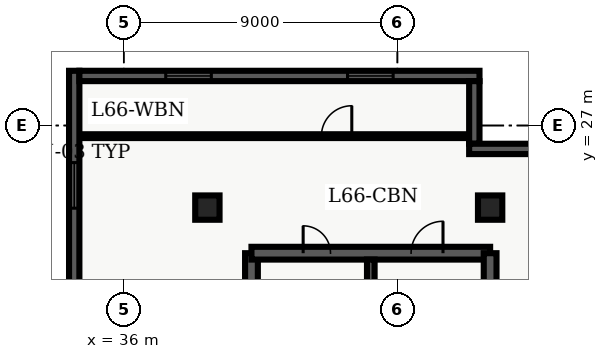
"""IFC4 building model, lengths in metres.
Left out: names, types, materials, properties, quantities, classifications, styles, units other than length and angle.
Written with IfcOpenShell. Run it as: python <this file> out.ifc"""

import sys

from ifc_helpers import new_model, entity, si_unit, converted_unit, direction, frame, origin_with_axes, origin_2d_with_axis, place, context, subcontext, project, spatial, polyline, rectangle, outline, extrude, element, fill, save


model = new_model("IFC4")
c1 = context("Model", 3, precision=1e-05, world=origin_with_axes(), true_north=direction((0.0, 1.0)))
c2 = subcontext(c1, "Body", "Model", "MODEL_VIEW")
j1 = project(units=[si_unit("LENGTHUNIT", "METRE"), converted_unit("PLANEANGLEUNIT", "DEGREE", entity("IfcPlaneAngleMeasure", 0.017), si_unit("PLANEANGLEUNIT", "RADIAN"), dimensions=[0, 0, 0, 0, 0, 0, 0])], contexts=[c1])
p1 = place(None, origin_with_axes())
s1 = spatial("IfcSite", under=j1, at=p1, CompositionType="ELEMENT")
p2 = place(p1, origin_with_axes())
s2 = spatial("IfcBuilding", under=s1, at=p2, CompositionType="ELEMENT")
p3 = place(p2, frame((0.0, 0.0, 268.5), z_axis=(0.0, 0.0, 1.0), x_axis=(1.0, 0.0, 0.0)))
s3 = spatial("IfcBuildingStorey", under=s2, at=p3, CompositionType="ELEMENT", Elevation=268.5)
p4 = place(p3, frame((40.2, 7.2, 0.0), z_axis=(0.0, 0.0, 1.0), x_axis=(0.0, 1.0, 0.0)))
e1 = element("IfcWall", 1, at=p4, inside=s3, PredefinedType="SHEAR", context=c2, shape_type="SweptSolid", body=[
    extrude(outline(polyline([(0.0, -0.21), (15.6, -0.21), (15.6, 0.21), (0.0, 0.21), (0.0, -0.21)])), origin_with_axes(), (0.0, 0.0, 1.0), 3.66),
])
p5 = place(p4, frame((12.75, 0.0, 0.0), z_axis=(0.0, 0.0, 1.0), x_axis=(1.0, 0.0, 0.0)))
e2 = element("IfcOpeningElement", 2, at=p5, cuts=e1, PredefinedType="OPENING", context=c2, shape_type="SweptSolid", body=[
    extrude(rectangle(XDim=1.2, YDim=0.44, at=origin_2d_with_axis()), origin_with_axes(), (0.0, 0.0, 1.0), 2.15),
])
p6 = place(p4, frame((9.3, 0.0, 0.0), z_axis=(0.0, 0.0, 1.0), x_axis=(1.0, 0.0, 0.0)))
e3 = element("IfcOpeningElement", 3, at=p6, cuts=e1, PredefinedType="OPENING", context=c2, shape_type="SweptSolid", body=[
    extrude(rectangle(XDim=0.9, YDim=0.44, at=origin_2d_with_axis()), origin_with_axes(), (0.0, 0.0, 1.0), 2.15),
])
p7 = place(p3, frame((40.2, 22.8, 0.0), z_axis=(0.0, 0.0, 1.0), x_axis=(1.0, 0.0, 0.0)))
e4 = element("IfcWall", 4, at=p7, inside=s3, PredefinedType="SHEAR", context=c2, shape_type="SweptSolid", body=[
    extrude(outline(polyline([(0.0, -0.21), (7.85, -0.21), (7.85, 0.21), (0.0, 0.21), (0.0, -0.21)])), origin_with_axes(), (0.0, 0.0, 1.0), 3.66),
])
p8 = place(p7, frame((5.775, 0.0, 0.0), z_axis=(0.0, 0.0, 1.0), x_axis=(1.0, 0.0, 0.0)))
e5 = element("IfcOpeningElement", 5, at=p8, cuts=e4, PredefinedType="OPENING", context=c2, shape_type="SweptSolid", body=[
    extrude(rectangle(XDim=1.05, YDim=0.44, at=origin_2d_with_axis()), origin_with_axes(), (0.0, 0.0, 1.0), 2.15),
])
p9 = place(p7, frame((2.15, 0.0, 0.0), z_axis=(0.0, 0.0, 1.0), x_axis=(1.0, 0.0, 0.0)))
e6 = element("IfcOpeningElement", 6, at=p9, cuts=e4, PredefinedType="OPENING", context=c2, shape_type="SweptSolid", body=[
    extrude(rectangle(XDim=0.9, YDim=0.44, at=origin_2d_with_axis()), origin_with_axes(), (0.0, 0.0, 1.0), 2.15),
])
p10 = place(p3, frame((48.05, 7.2, 0.0), z_axis=(0.0, 0.0, 1.0), x_axis=(0.0, 1.0, 0.0)))
e7 = element("IfcWall", 7, at=p10, inside=s3, PredefinedType="SHEAR", context=c2, shape_type="SweptSolid", body=[
    extrude(outline(polyline([(0.0, -0.21), (15.6, -0.21), (15.6, 0.21), (0.0, 0.21), (0.0, -0.21)])), origin_with_axes(), (0.0, 0.0, 1.0), 3.66),
])
p11 = place(p10, frame((1.375, 0.0, 0.0), z_axis=(0.0, 0.0, 1.0), x_axis=(1.0, 0.0, 0.0)))
e8 = element("IfcOpeningElement", 8, at=p11, cuts=e7, PredefinedType="OPENING", context=c2, shape_type="SweptSolid", body=[
    extrude(rectangle(XDim=1.05, YDim=0.44, at=origin_2d_with_axis()), origin_with_axes(), (0.0, 0.0, 1.0), 2.15),
])
p12 = place(p10, frame((5.125, 0.0, 0.0), z_axis=(0.0, 0.0, 1.0), x_axis=(1.0, 0.0, 0.0)))
e9 = element("IfcOpeningElement", 9, at=p12, cuts=e7, PredefinedType="OPENING", context=c2, shape_type="SweptSolid", body=[
    extrude(rectangle(XDim=0.95, YDim=0.44, at=origin_2d_with_axis()), origin_with_axes(), (0.0, 0.0, 1.0), 2.15),
])
p13 = place(p3, frame((44.125, 7.41, 0.0), z_axis=(0.0, 0.0, 1.0), x_axis=(0.0, 1.0, 0.0)))
e10 = element("IfcWall", 10, at=p13, inside=s3, PredefinedType="SHEAR", context=c2, shape_type="SweptSolid", body=[
    extrude(outline(polyline([(0.0, -0.125), (15.18, -0.125), (15.18, 0.125), (0.0, 0.125), (0.0, -0.125)])), origin_with_axes(), (0.0, 0.0, 1.0), 3.66),
])
for number, where, z_axis, x_axis in (
    (11, (38.75, 24.3, 0.0), (0.0, 0.0, 1.0), (1.0, 0.0, 0.0)),
    (12, (48.05, 24.3, 0.0), (0.0, 0.0, 1.0), (1.0, 0.0, 0.0)),
):
    element("IfcColumn", number, at=place(p3, frame(where, z_axis=z_axis, x_axis=x_axis)), inside=s3, PredefinedType="COLUMN", context=c2, shape_type="SweptSolid", body=[
        extrude(rectangle(XDim=0.8, YDim=0.8, at=origin_2d_with_axis()), origin_with_axes(), (0.0, 0.0, 1.0), 3.9),
    ])
p14 = place(p3, frame((34.535, 26.65, 0.0), z_axis=(0.0, 0.0, 1.0), x_axis=(1.0, 0.0, 0.0)))
e13 = element("IfcWall", 13, at=p14, inside=s3, PredefinedType="PARTITIONING", context=c2, shape_type="SweptSolid", body=[
    extrude(outline(polyline([(0.0, -0.062), (12.995, -0.062), (12.995, 0.062), (0.0, 0.062), (0.0, -0.062)])), origin_with_axes(), (0.0, 0.0, 1.0), 2.7),
])
p15 = place(p14, frame((8.465, 0.0, 0.0), z_axis=(0.0, 0.0, 1.0), x_axis=(1.0, 0.0, 0.0)))
e14 = element("IfcOpeningElement", 14, at=p15, cuts=e13, PredefinedType="OPENING", context=c2, shape_type="SweptSolid", body=[
    extrude(rectangle(XDim=1.0, YDim=0.145, at=origin_2d_with_axis()), origin_with_axes(), (0.0, 0.0, 1.0), 2.15),
])
p16 = place(p3, frame((34.37, 21.26, 0.0), z_axis=(0.0, 0.0, 1.0), x_axis=(0.0, 1.0, 0.0)))
e15 = element("IfcWall", 15, at=p16, inside=s3, PredefinedType="SOLIDWALL", context=c2, shape_type="SweptSolid", body=[
    extrude(outline(polyline([(0.0, -0.17), (7.54, -0.17), (7.54, 0.17), (0.0, 0.17), (0.0, -0.17)])), origin_with_axes(), (0.0, 0.0, 1.0), 3.66),
])
p17 = place(p16, frame((3.77, 0.0, 0.45), z_axis=(0.0, 0.0, 1.0), x_axis=(1.0, 0.0, 0.0)))
e16 = element("IfcOpeningElement", 16, at=p17, cuts=e15, PredefinedType="OPENING", context=c2, shape_type="SweptSolid", body=[
    extrude(rectangle(XDim=1.5, YDim=0.36, at=origin_2d_with_axis()), origin_with_axes(), (0.0, 0.0, 1.0), 2.1),
])
p18 = place(p3, frame((34.54, 28.63, 0.0), z_axis=(0.0, 0.0, 1.0), x_axis=(1.0, 0.0, 0.0)))
e17 = element("IfcWall", 17, at=p18, inside=s3, PredefinedType="SOLIDWALL", context=c2, shape_type="SweptSolid", body=[
    extrude(outline(polyline([(0.0, -0.17), (13.16, -0.17), (13.16, 0.17), (0.0, 0.17), (0.0, -0.17)])), origin_with_axes(), (0.0, 0.0, 1.0), 3.66),
])
p19 = place(p18, frame((3.59, 0.0, 0.45), z_axis=(0.0, 0.0, 1.0), x_axis=(1.0, 0.0, 0.0)))
e18 = element("IfcOpeningElement", 18, at=p19, cuts=e17, PredefinedType="OPENING", context=c2, shape_type="SweptSolid", body=[
    extrude(rectangle(XDim=1.5, YDim=0.36, at=origin_2d_with_axis()), origin_with_axes(), (0.0, 0.0, 1.0), 2.1),
])
p20 = place(p18, frame((9.57, 0.0, 0.45), z_axis=(0.0, 0.0, 1.0), x_axis=(1.0, 0.0, 0.0)))
e19 = element("IfcOpeningElement", 19, at=p20, cuts=e17, PredefinedType="OPENING", context=c2, shape_type="SweptSolid", body=[
    extrude(rectangle(XDim=1.5, YDim=0.36, at=origin_2d_with_axis()), origin_with_axes(), (0.0, 0.0, 1.0), 2.1),
])
p21 = place(p3, frame((47.53, 28.46, 0.0), z_axis=(0.0, 0.0, 1.0), x_axis=(0.0, -1.0, 0.0)))
e20 = element("IfcWall", 20, at=p21, inside=s3, PredefinedType="SOLIDWALL", context=c2, shape_type="SweptSolid", body=[
    extrude(outline(polyline([(0.0, -0.17), (2.06, -0.17), (2.06, 0.17), (0.0, 0.17), (0.0, -0.17)])), origin_with_axes(), (0.0, 0.0, 1.0), 3.66),
])
p22 = place(p3, frame((47.36, 26.23, 0.0), z_axis=(0.0, 0.0, 1.0), x_axis=(1.0, 0.0, 0.0)))
e21 = element("IfcWall", 21, at=p22, inside=s3, PredefinedType="SOLIDWALL", context=c2, shape_type="SweptSolid", body=[
    extrude(outline(polyline([(0.0, -0.17), (2.74, -0.17), (2.74, 0.17), (0.0, 0.17), (0.0, -0.17)])), origin_with_axes(), (0.0, 0.0, 1.0), 3.66),
])
p23 = place(p7, frame((5.775, 0.0, 0.0), z_axis=(0.0, 0.0, 1.0), x_axis=(1.0, 0.0, 0.0)))
e22 = element("IfcDoor", 22, at=p23, inside=s3, OperationType="SINGLE_SWING_RIGHT", PredefinedType="DOOR", context=c2, shape_type="SweptSolid", body=[
    extrude(rectangle(XDim=1.05, YDim=0.09, at=origin_2d_with_axis()), origin_with_axes(), (0.0, 0.0, 1.0), 2.15),
])
fill(e5, e22)
p24 = place(p7, frame((2.15, 0.0, 0.0), z_axis=(0.0, 0.0, 1.0), x_axis=(1.0, 0.0, 0.0)))
e23 = element("IfcDoor", 23, at=p24, inside=s3, OperationType="SINGLE_SWING_LEFT", PredefinedType="DOOR", context=c2, shape_type="SweptSolid", body=[
    extrude(rectangle(XDim=0.9, YDim=0.09, at=origin_2d_with_axis()), origin_with_axes(), (0.0, 0.0, 1.0), 2.15),
])
fill(e6, e23)
p25 = place(p14, frame((8.465, 0.0, 0.0), z_axis=(0.0, 0.0, 1.0), x_axis=(1.0, 0.0, 0.0)))
e24 = element("IfcDoor", 24, at=p25, inside=s3, OperationType="SINGLE_SWING_RIGHT", PredefinedType="DOOR", context=c2, shape_type="SweptSolid", body=[
    extrude(rectangle(XDim=1.0, YDim=0.075, at=origin_2d_with_axis()), origin_with_axes(), (0.0, 0.0, 1.0), 2.15),
])
fill(e14, e24)
p26 = place(p16, frame((3.77, 0.0, 0.45), z_axis=(0.0, 0.0, 1.0), x_axis=(1.0, 0.0, 0.0)))
e25 = element("IfcWindow", 25, at=p26, inside=s3, PredefinedType="WINDOW", context=c2, shape_type="SweptSolid", body=[
    extrude(rectangle(XDim=1.5, YDim=0.09, at=origin_2d_with_axis()), origin_with_axes(), (0.0, 0.0, 1.0), 2.1),
])
fill(e16, e25)
p27 = place(p18, frame((3.59, 0.0, 0.45), z_axis=(0.0, 0.0, 1.0), x_axis=(1.0, 0.0, 0.0)))
e26 = element("IfcWindow", 26, at=p27, inside=s3, PredefinedType="WINDOW", context=c2, shape_type="SweptSolid", body=[
    extrude(rectangle(XDim=1.5, YDim=0.09, at=origin_2d_with_axis()), origin_with_axes(), (0.0, 0.0, 1.0), 2.1),
])
fill(e18, e26)
p28 = place(p18, frame((9.57, 0.0, 0.45), z_axis=(0.0, 0.0, 1.0), x_axis=(1.0, 0.0, 0.0)))
e27 = element("IfcWindow", 27, at=p28, inside=s3, PredefinedType="WINDOW", context=c2, shape_type="SweptSolid", body=[
    extrude(rectangle(XDim=1.5, YDim=0.09, at=origin_2d_with_axis()), origin_with_axes(), (0.0, 0.0, 1.0), 2.1),
])
fill(e19, e27)
save(model, sys.argv[1])
